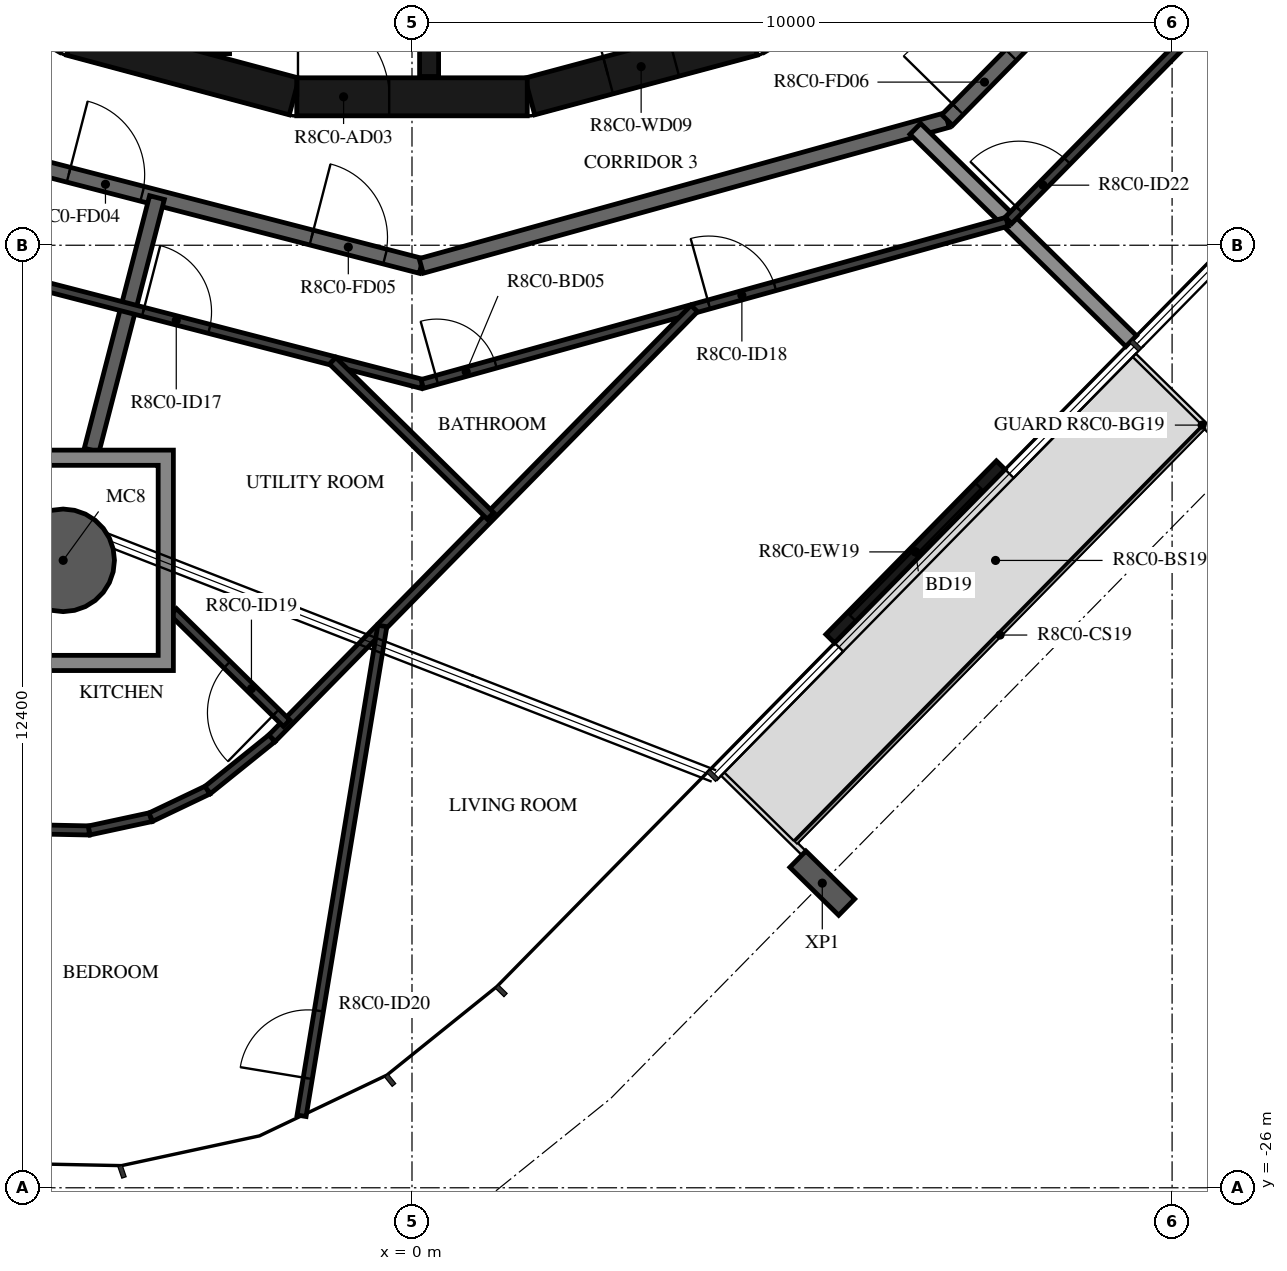
"""IFC4 building model, lengths in metres.
Left out: names, types, materials, properties, quantities, classifications, styles, units other than length and angle.
Written with IfcOpenShell. Run it as: python <this file> out.ifc"""

import sys

from ifc_helpers import new_model, si_unit, direction, frame, frame_2d, origin, origin_2d, place, context, subcontext, project, spatial, polyline, rectangle, hollow_circle, i_section, outline, extrude, element, fill, save


model = new_model("IFC4")
c1 = context("Model", 3, precision=1e-05, world=origin(), true_north=direction((0.0, 1.0)))
c2 = subcontext(c1, "Body", "Model", "MODEL_VIEW")
j1 = project(units=[si_unit("LENGTHUNIT", "METRE"), si_unit("PLANEANGLEUNIT", "RADIAN")], contexts=[c1])
p1 = place(None, origin())
s1 = spatial("IfcSite", under=j1, at=p1, CompositionType="ELEMENT")
p2 = place(p1, origin())
s2 = spatial("IfcBuilding", under=s1, at=p2, CompositionType="ELEMENT")
p3 = place(p2, frame((0.0, 0.0, 319.2)))
s3 = spatial("IfcBuildingStorey", under=s2, at=p3, CompositionType="ELEMENT", Elevation=319.2)
p4 = place(p3, frame((-4.589, -17.745, -0.38), z_axis=(0.0, 0.0, 1.0), x_axis=(1.0, 0.0, 0.0)))
e1 = element("IfcColumn", 1, at=p4, inside=s3, PredefinedType="COLUMN", context=c2, shape_type="SweptSolid", body=[
    extrude(hollow_circle(Radius=0.675, WallThickness=0.03, at=origin_2d()), origin(), (0.0, 0.0, 1.0), 3.5),
])
p5 = place(p3, frame((5.398, -21.992, -0.38), z_axis=(0.0, 0.0, 1.0), x_axis=(-0.70090935439, -0.713250360623, 0.0)))
e2 = element("IfcColumn", 2, at=p5, inside=s3, PredefinedType="COLUMN", context=c2, shape_type="SweptSolid", body=[
    extrude(i_section(OverallWidth=0.3, OverallDepth=0.9, WebThickness=0.019, FlangeThickness=0.035, FilletRadius=0.03, at=origin_2d()), origin(), (0.0, 0.0, 1.0), 3.5),
])
p6 = place(p3, frame((5.502, -18.776, 0.0), z_axis=(0.0, 0.0, 1.0), x_axis=(0.700900076932, 0.713259477439, 0.0)))
e3 = element("IfcWall", 3, at=p6, inside=s3, PredefinedType="STANDARD", context=c2, shape_type="SweptSolid", body=[
    extrude(rectangle(XDim=3.2, YDim=0.16, at=frame_2d((1.6, 0.0))), origin(), (0.0, 0.0, 1.0), 3.12),
])
p7 = place(p6, frame((0.4, 0.0, 0.0)))
e4 = element("IfcOpeningElement", 4, at=p7, cuts=e3, PredefinedType="OPENING", context=c2, shape_type="SweptSolid", body=[
    extrude(rectangle(XDim=2.4, YDim=2.4, at=frame_2d((1.2, 1.2))), frame((0.0, 0.09, 0.0), z_axis=(0.0, -1.0, 0.0), x_axis=(1.0, 0.0, 0.0)), (0.0, 0.0, 1.0), 0.18),
])
p8 = place(p3, frame((1.55, -11.643, 0.0), z_axis=(0.0, 0.0, 1.0), x_axis=(0.965948410781, 0.258734743916, 0.0)))
e5 = element("IfcWall", 5, at=p8, inside=s3, PredefinedType="SHEAR", context=c2, shape_type="SweptSolid", body=[
    extrude(rectangle(XDim=3.033, YDim=0.5, at=frame_2d((1.516, 0.0))), origin(), (0.0, 0.0, 1.0), 3.12),
])
p9 = place(p8, frame((1.066, 0.0, 0.0)))
e6 = element("IfcOpeningElement", 6, at=p9, cuts=e5, PredefinedType="OPENING", context=c2, shape_type="SweptSolid", body=[
    extrude(rectangle(XDim=0.9, YDim=2.1, at=frame_2d((0.45, 1.05))), frame((0.0, 0.26, 0.0), z_axis=(0.0, -1.0, 0.0), x_axis=(1.0, 0.0, 0.0)), (0.0, 0.0, 1.0), 0.52),
])
p10 = place(p3, frame((-4.479, -10.858, 0.0), z_axis=(0.0, 0.0, 1.0), x_axis=(0.965948410781, -0.258734743916, 0.0)))
e7 = element("IfcWall", 7, at=p10, inside=s3, PredefinedType="SHEAR", context=c2, shape_type="SweptSolid", body=[
    extrude(rectangle(XDim=3.033, YDim=0.5, at=frame_2d((1.516, 0.0))), origin(), (0.0, 0.0, 1.0), 3.12),
])
p11 = place(p3, frame((-1.516, -11.647, 0.0), z_axis=(0.0, 0.0, 1.0), x_axis=(1.0, 0.0, 0.0)))
e8 = element("IfcWall", 8, at=p11, inside=s3, PredefinedType="SHEAR", context=c2, shape_type="SweptSolid", body=[
    extrude(rectangle(XDim=3.033, YDim=0.5, at=frame_2d((1.516, 0.0))), origin(), (0.0, 0.0, 1.0), 3.12),
])
p12 = place(p11, frame((0.016, 0.0, 0.0)))
e9 = element("IfcOpeningElement", 9, at=p12, cuts=e8, PredefinedType="OPENING", context=c2, shape_type="SweptSolid", body=[
    extrude(rectangle(XDim=1.2, YDim=2.1, at=frame_2d((0.6, 1.05))), frame((0.0, 0.26, 0.0), z_axis=(0.0, -1.0, 0.0), x_axis=(1.0, 0.0, 0.0)), (0.0, 0.0, 1.0), 0.52),
])
p13 = place(p3, frame((-2.525, -8.97, 0.0), z_axis=(0.0, 0.0, 1.0), x_axis=(0.0, -1.0, 0.0)))
e10 = element("IfcWall", 10, at=p13, inside=s3, PredefinedType="SHEAR", context=c2, shape_type="SweptSolid", body=[
    extrude(rectangle(XDim=2.11, YDim=0.25, at=frame_2d((1.055, 0.0))), origin(), (0.0, 0.0, 1.0), 3.12),
])
p14 = place(p3, frame((0.225, -8.97, 0.0), z_axis=(0.0, 0.0, 1.0), x_axis=(0.0, -1.0, 0.0)))
e11 = element("IfcWall", 11, at=p14, inside=s3, PredefinedType="SHEAR", context=c2, shape_type="SweptSolid", body=[
    extrude(rectangle(XDim=2.41, YDim=0.25, at=frame_2d((1.205, 0.0))), origin(), (0.0, 0.0, 1.0), 3.12),
])
p15 = place(p3, frame((-6.831, -12.074, 0.0), z_axis=(0.0, 0.0, 1.0), x_axis=(0.968144780225, -0.250391063186, 0.0)))
e12 = element("IfcWall", 12, at=p15, inside=s3, PredefinedType="STANDARD", context=c2, shape_type="SweptSolid", body=[
    extrude(rectangle(XDim=7.181, YDim=0.2, at=frame_2d((3.591, 0.0))), origin(), (0.0, 0.0, 1.0), 3.12),
])
p16 = place(p15, frame((2.39, 0.0, 0.0)))
e13 = element("IfcOpeningElement", 13, at=p16, cuts=e12, PredefinedType="OPENING", context=c2, shape_type="SweptSolid", body=[
    extrude(rectangle(XDim=1.0, YDim=2.1, at=frame_2d((0.5, 1.05))), frame((0.0, 0.11, 0.0), z_axis=(0.0, -1.0, 0.0), x_axis=(1.0, 0.0, 0.0)), (0.0, 0.0, 1.0), 0.22),
])
p17 = place(p15, frame((5.69, 0.0, 0.0)))
e14 = element("IfcOpeningElement", 14, at=p17, cuts=e12, PredefinedType="OPENING", context=c2, shape_type="SweptSolid", body=[
    extrude(rectangle(XDim=1.0, YDim=2.1, at=frame_2d((0.5, 1.05))), frame((0.0, 0.11, 0.0), z_axis=(0.0, -1.0, 0.0), x_axis=(1.0, 0.0, 0.0)), (0.0, 0.0, 1.0), 0.22),
])
p18 = place(p3, frame((0.121, -13.872, 0.0), z_axis=(0.0, 0.0, 1.0), x_axis=(0.963625960674, 0.267254575108, 0.0)))
e15 = element("IfcWall", 15, at=p18, inside=s3, PredefinedType="STANDARD", context=c2, shape_type="SweptSolid", body=[
    extrude(rectangle(XDim=7.181, YDim=0.2, at=frame_2d((3.591, 0.0))), origin(), (0.0, 0.0, 1.0), 3.12),
])
p19 = place(p3, frame((7.041, -11.953, 0.0), z_axis=(0.0, 0.0, 1.0), x_axis=(0.70090916255, 0.713250549143, 0.0)))
e16 = element("IfcWall", 16, at=p19, inside=s3, PredefinedType="STANDARD", context=c2, shape_type="SweptSolid", body=[
    extrude(rectangle(XDim=7.181, YDim=0.2, at=frame_2d((3.59, 0.0))), origin(), (0.0, 0.0, 1.0), 3.12),
])
p20 = place(p19, frame((0.2, 0.0, 0.0)))
e17 = element("IfcOpeningElement", 17, at=p20, cuts=e16, PredefinedType="OPENING", context=c2, shape_type="SweptSolid", body=[
    extrude(rectangle(XDim=1.0, YDim=2.1, at=frame_2d((0.5, 1.05))), frame((0.0, 0.11, 0.0), z_axis=(0.0, -1.0, 0.0), x_axis=(1.0, 0.0, 0.0)), (0.0, 0.0, 1.0), 0.22),
])
p21 = place(p3, frame((-4.214, -16.295, 0.0), z_axis=(0.0, 0.0, 1.0), x_axis=(0.250428810918, 0.968135016752, 0.0)))
e18 = element("IfcWall", 18, at=p21, inside=s3, PredefinedType="STANDARD", context=c2, shape_type="SweptSolid", body=[
    extrude(rectangle(XDim=3.432, YDim=0.2, at=frame_2d((1.716, 0.0))), origin(), (0.0, 0.0, 1.0), 3.12),
])
p22 = place(p3, frame((9.462, -14.861, 0.0), z_axis=(0.0, 0.0, 1.0), x_axis=(-0.713302018318, 0.700856783276, 0.0)))
e19 = element("IfcWall", 19, at=p22, inside=s3, PredefinedType="STANDARD", context=c2, shape_type="SweptSolid", body=[
    extrude(rectangle(XDim=3.982, YDim=0.2, at=frame_2d((1.991, 0.0))), origin(), (0.0, 0.0, 1.0), 2.73),
])
p23 = place(p3, frame((-7.05, -13.567, 0.0), z_axis=(0.0, 0.0, 1.0), x_axis=(0.968142373865, -0.250400367264, 0.0)))
e20 = element("IfcWall", 20, at=p23, inside=s3, PredefinedType="PARTITIONING", context=c2, shape_type="SweptSolid", body=[
    extrude(rectangle(XDim=7.421, YDim=0.12, at=frame_2d((3.71, 0.0))), origin(), (0.0, 0.0, 1.0), 3.12),
])
p24 = place(p23, frame((3.628, 0.0, 0.0)))
e21 = element("IfcOpeningElement", 21, at=p24, cuts=e20, PredefinedType="OPENING", context=c2, shape_type="SweptSolid", body=[
    extrude(rectangle(XDim=0.9, YDim=2.1, at=frame_2d((0.45, 1.05))), frame((0.0, 0.07, 0.0), z_axis=(0.0, -1.0, 0.0), x_axis=(1.0, 0.0, 0.0)), (0.0, 0.0, 1.0), 0.14),
])
p25 = place(p3, frame((0.135, -15.425, 0.0), z_axis=(0.0, 0.0, 1.0), x_axis=(0.963633899075, 0.267225950373, 0.0)))
e22 = element("IfcWall", 22, at=p25, inside=s3, PredefinedType="PARTITIONING", context=c2, shape_type="SweptSolid", body=[
    extrude(rectangle(XDim=7.985, YDim=0.12, at=frame_2d((3.992, 0.0))), origin(), (0.0, 0.0, 1.0), 3.12),
])
p26 = place(p25, frame((0.2, 0.0, 0.0)))
e23 = element("IfcOpeningElement", 23, at=p26, cuts=e22, PredefinedType="OPENING", context=c2, shape_type="SweptSolid", body=[
    extrude(rectangle(XDim=0.8, YDim=2.1, at=frame_2d((0.4, 1.05))), frame((0.0, 0.07, 0.0), z_axis=(0.0, -1.0, 0.0), x_axis=(1.0, 0.0, 0.0)), (0.0, 0.0, 1.0), 0.14),
])
p27 = place(p25, frame((3.914, 0.0, 0.0)))
e24 = element("IfcOpeningElement", 24, at=p27, cuts=e22, PredefinedType="OPENING", context=c2, shape_type="SweptSolid", body=[
    extrude(rectangle(XDim=0.9, YDim=2.1, at=frame_2d((0.45, 1.05))), frame((0.0, 0.07, 0.0), z_axis=(0.0, -1.0, 0.0), x_axis=(1.0, 0.0, 0.0)), (0.0, 0.0, 1.0), 0.14),
])
for number, where, z_axis, x_axis in (
    (25, (-5.076, -21.282, 0.0), (0.0, 0.0, 1.0), (1.0, -0.02, 0.0)),
    (26, (-4.247, -21.299, 0.0), (0.0, 0.0, 1.0), (0.978, 0.211, 0.0)),
):
    element("IfcWall", number, at=place(p3, frame(where, z_axis=z_axis, x_axis=x_axis)), inside=s3, PredefinedType="PARTITIONING", context=c2, shape_type="SweptSolid", body=[
        extrude(rectangle(XDim=0.829, YDim=0.12, at=frame_2d((0.415, 0.0))), origin(), (0.0, 0.0, 1.0), 3.12),
    ])
p28 = place(p3, frame((-3.437, -21.124, 0.0), z_axis=(0.0, 0.0, 1.0), x_axis=(0.902637137035, 0.430402368541, 0.0)))
e27 = element("IfcWall", 27, at=p28, inside=s3, PredefinedType="PARTITIONING", context=c2, shape_type="SweptSolid", body=[
    extrude(rectangle(XDim=0.829, YDim=0.12, at=frame_2d((0.414, 0.0))), origin(), (0.0, 0.0, 1.0), 3.12),
])
p29 = place(p3, frame((-2.689, -20.768, 0.0), z_axis=(0.0, 0.0, 1.0), x_axis=(0.778936756675, 0.627102486919, 0.0)))
e28 = element("IfcWall", 28, at=p29, inside=s3, PredefinedType="PARTITIONING", context=c2, shape_type="SweptSolid", body=[
    extrude(rectangle(XDim=1.087, YDim=0.12, at=frame_2d((0.543, 0.0))), origin(), (0.0, 0.0, 1.0), 3.12),
])
p30 = place(p3, frame((-1.842, -20.086, 0.0), z_axis=(0.0, 0.0, 1.0), x_axis=(0.700919640212, 0.713240252625, 0.0)))
e29 = element("IfcWall", 29, at=p30, inside=s3, PredefinedType="PARTITIONING", context=c2, shape_type="SweptSolid", body=[
    extrude(rectangle(XDim=7.926, YDim=0.12, at=frame_2d((3.963, 0.0))), origin(), (0.0, 0.0, 1.0), 3.12),
])
p31 = place(p3, frame((-1.649, -19.889, 0.0), z_axis=(0.0, 0.0, 1.0), x_axis=(-0.713270858454, 0.700888495041, 0.0)))
e30 = element("IfcWall", 30, at=p31, inside=s3, PredefinedType="PARTITIONING", context=c2, shape_type="SweptSolid", body=[
    extrude(rectangle(XDim=2.09, YDim=0.12, at=frame_2d((1.045, 0.0))), origin(), (0.0, 0.0, 1.0), 3.12),
])
p32 = place(p31, frame((0.2, 0.0, 0.0)))
e31 = element("IfcOpeningElement", 31, at=p32, cuts=e30, PredefinedType="OPENING", context=c2, shape_type="SweptSolid", body=[
    extrude(rectangle(XDim=0.9, YDim=2.1, at=frame_2d((0.45, 1.05))), frame((0.0, 0.07, 0.0), z_axis=(0.0, -1.0, 0.0), x_axis=(1.0, 0.0, 0.0)), (0.0, 0.0, 1.0), 0.14),
])
p33 = place(p3, frame((-1.453, -25.053, 0.0), z_axis=(0.0, 0.0, 1.0), x_axis=(0.162683241952, 0.986678348191, 0.0)))
e32 = element("IfcWall", 32, at=p33, inside=s3, PredefinedType="PARTITIONING", context=c2, shape_type="SweptSolid", body=[
    extrude(rectangle(XDim=6.531, YDim=0.12, at=frame_2d((3.266, 0.0))), origin(), (0.0, 0.0, 1.0), 3.12),
])
p34 = place(p33, frame((0.5, 0.0, 0.0)))
e33 = element("IfcOpeningElement", 33, at=p34, cuts=e32, PredefinedType="OPENING", context=c2, shape_type="SweptSolid", body=[
    extrude(rectangle(XDim=0.9, YDim=2.1, at=frame_2d((0.45, 1.05))), frame((0.0, 0.07, 0.0), z_axis=(0.0, -1.0, 0.0), x_axis=(1.0, 0.0, 0.0)), (0.0, 0.0, 1.0), 0.14),
])
p35 = place(p3, frame((1.032, -17.161, 0.0), z_axis=(0.0, 0.0, 1.0), x_axis=(-0.713201827259, 0.700958738867, 0.0)))
e34 = element("IfcWall", 34, at=p35, inside=s3, PredefinedType="PARTITIONING", context=c2, shape_type="SweptSolid", body=[
    extrude(rectangle(XDim=2.911, YDim=0.12, at=frame_2d((1.456, 0.0))), origin(), (0.0, 0.0, 1.0), 3.12),
])
p36 = place(p3, frame((7.846, -13.273, 0.0), z_axis=(0.0, 0.0, 1.0), x_axis=(0.700911018066, 0.713248725728, 0.0)))
e35 = element("IfcWall", 35, at=p36, inside=s3, PredefinedType="PARTITIONING", context=c2, shape_type="SweptSolid", body=[
    extrude(rectangle(XDim=7.935, YDim=0.12, at=frame_2d((3.968, 0.0))), origin(), (0.0, 0.0, 1.0), 3.12),
])
p37 = place(p36, frame((0.2, 0.0, 0.0)))
e36 = element("IfcOpeningElement", 36, at=p37, cuts=e35, PredefinedType="OPENING", context=c2, shape_type="SweptSolid", body=[
    extrude(rectangle(XDim=0.9, YDim=2.1, at=frame_2d((0.45, 1.05))), frame((0.0, 0.07, 0.0), z_axis=(0.0, -1.0, 0.0), x_axis=(1.0, 0.0, 0.0)), (0.0, 0.0, 1.0), 0.14),
])
p38 = place(p3, origin())
e37 = element("IfcWall", 37, at=p38, inside=s3, PredefinedType="STANDARD", context=c2, shape_type="SweptSolid", body=[
    extrude(outline(polyline([(-3.139, -16.295), (-3.139, -19.195), (-6.039, -19.195), (-6.039, -16.295), (-3.139, -16.295)]), holes=[polyline([(-5.839, -18.995), (-3.339, -18.995), (-3.339, -16.495), (-5.839, -16.495), (-5.839, -18.995)])]), origin(), (0.0, 0.0, 1.0), 3.12),
])
p39 = place(p7, origin())
e38 = element("IfcDoor", 38, at=p39, inside=s3, OperationType="DOUBLE_DOOR_SLIDING", PredefinedType="DOOR", context=c2, shape_type="SweptSolid", body=[
    extrude(rectangle(XDim=2.4, YDim=2.4, at=frame_2d((1.2, 1.2))), frame((0.0, 0.025, 0.0), z_axis=(0.0, -1.0, 0.0), x_axis=(1.0, 0.0, 0.0)), (0.0, 0.0, 1.0), 0.05),
])
fill(e4, e38)
p40 = place(p12, origin())
e39 = element("IfcDoor", 39, at=p40, inside=s3, OperationType="SINGLE_SWING_RIGHT", PredefinedType="DOOR", context=c2, shape_type="SweptSolid", body=[
    extrude(rectangle(XDim=1.2, YDim=2.1, at=frame_2d((0.6, 1.05))), frame((0.0, 0.025, 0.0), z_axis=(0.0, -1.0, 0.0), x_axis=(1.0, 0.0, 0.0)), (0.0, 0.0, 1.0), 0.05),
])
fill(e9, e39)
p41 = place(p9, origin())
e40 = element("IfcDoor", 40, at=p41, inside=s3, OperationType="SINGLE_SWING_LEFT", PredefinedType="DOOR", context=c2, shape_type="SweptSolid", body=[
    extrude(rectangle(XDim=0.9, YDim=2.1, at=frame_2d((0.45, 1.05))), frame((0.0, 0.025, 0.0), z_axis=(0.0, -1.0, 0.0), x_axis=(1.0, 0.0, 0.0)), (0.0, 0.0, 1.0), 0.05),
])
fill(e6, e40)
p42 = place(p16, origin())
e41 = element("IfcDoor", 41, at=p42, inside=s3, OperationType="SINGLE_SWING_RIGHT", PredefinedType="DOOR", context=c2, shape_type="SweptSolid", body=[
    extrude(rectangle(XDim=1.0, YDim=2.1, at=frame_2d((0.5, 1.05))), frame((0.0, 0.025, 0.0), z_axis=(0.0, -1.0, 0.0), x_axis=(1.0, 0.0, 0.0)), (0.0, 0.0, 1.0), 0.05),
])
fill(e13, e41)
p43 = place(p17, origin())
e42 = element("IfcDoor", 42, at=p43, inside=s3, OperationType="SINGLE_SWING_LEFT", PredefinedType="DOOR", context=c2, shape_type="SweptSolid", body=[
    extrude(rectangle(XDim=1.0, YDim=2.1, at=frame_2d((0.5, 1.05))), frame((0.0, 0.025, 0.0), z_axis=(0.0, -1.0, 0.0), x_axis=(1.0, 0.0, 0.0)), (0.0, 0.0, 1.0), 0.05),
])
fill(e14, e42)
p44 = place(p24, origin())
e43 = element("IfcDoor", 43, at=p44, inside=s3, OperationType="SINGLE_SWING_RIGHT", PredefinedType="DOOR", context=c2, shape_type="SweptSolid", body=[
    extrude(rectangle(XDim=0.9, YDim=2.1, at=frame_2d((0.45, 1.05))), frame((0.0, 0.025, 0.0), z_axis=(0.0, -1.0, 0.0), x_axis=(1.0, 0.0, 0.0)), (0.0, 0.0, 1.0), 0.05),
])
fill(e21, e43)
p45 = place(p26, origin())
e44 = element("IfcDoor", 44, at=p45, inside=s3, OperationType="SINGLE_SWING_LEFT", PredefinedType="DOOR", context=c2, shape_type="SweptSolid", body=[
    extrude(rectangle(XDim=0.8, YDim=2.1, at=frame_2d((0.4, 1.05))), frame((0.0, 0.025, 0.0), z_axis=(0.0, -1.0, 0.0), x_axis=(1.0, 0.0, 0.0)), (0.0, 0.0, 1.0), 0.05),
])
fill(e23, e44)
p46 = place(p27, origin())
e45 = element("IfcDoor", 45, at=p46, inside=s3, OperationType="SINGLE_SWING_LEFT", PredefinedType="DOOR", context=c2, shape_type="SweptSolid", body=[
    extrude(rectangle(XDim=0.9, YDim=2.1, at=frame_2d((0.45, 1.05))), frame((0.0, 0.025, 0.0), z_axis=(0.0, -1.0, 0.0), x_axis=(1.0, 0.0, 0.0)), (0.0, 0.0, 1.0), 0.05),
])
fill(e24, e45)
p47 = place(p32, origin())
e46 = element("IfcDoor", 46, at=p47, inside=s3, OperationType="SINGLE_SWING_LEFT", PredefinedType="DOOR", context=c2, shape_type="SweptSolid", body=[
    extrude(rectangle(XDim=0.9, YDim=2.1, at=frame_2d((0.45, 1.05))), frame((0.0, 0.025, 0.0), z_axis=(0.0, -1.0, 0.0), x_axis=(1.0, 0.0, 0.0)), (0.0, 0.0, 1.0), 0.05),
])
fill(e31, e46)
p48 = place(p34, origin())
e47 = element("IfcDoor", 47, at=p48, inside=s3, OperationType="SINGLE_SWING_LEFT", PredefinedType="DOOR", context=c2, shape_type="SweptSolid", body=[
    extrude(rectangle(XDim=0.9, YDim=2.1, at=frame_2d((0.45, 1.05))), frame((0.0, 0.025, 0.0), z_axis=(0.0, -1.0, 0.0), x_axis=(1.0, 0.0, 0.0)), (0.0, 0.0, 1.0), 0.05),
])
fill(e33, e47)
p49 = place(p20, origin())
e48 = element("IfcDoor", 48, at=p49, inside=s3, OperationType="SINGLE_SWING_LEFT", PredefinedType="DOOR", context=c2, shape_type="SweptSolid", body=[
    extrude(rectangle(XDim=1.0, YDim=2.1, at=frame_2d((0.5, 1.05))), frame((0.0, 0.025, 0.0), z_axis=(0.0, -1.0, 0.0), x_axis=(1.0, 0.0, 0.0)), (0.0, 0.0, 1.0), 0.05),
])
fill(e17, e48)
p50 = place(p37, origin())
e49 = element("IfcDoor", 49, at=p50, inside=s3, OperationType="SINGLE_SWING_LEFT", PredefinedType="DOOR", context=c2, shape_type="SweptSolid", body=[
    extrude(rectangle(XDim=0.9, YDim=2.1, at=frame_2d((0.45, 1.05))), frame((0.0, 0.025, 0.0), z_axis=(0.0, -1.0, 0.0), x_axis=(1.0, 0.0, 0.0)), (0.0, 0.0, 1.0), 0.05),
])
fill(e36, e49)
save(model, sys.argv[1])
